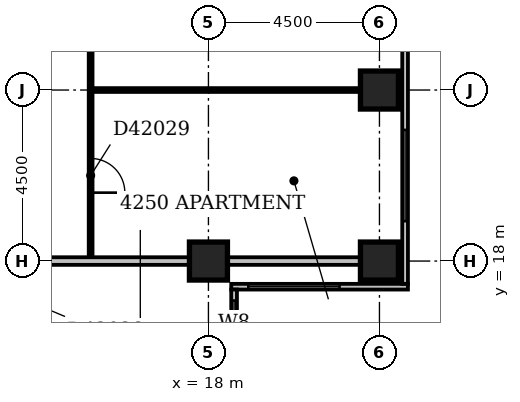
"""IFC4 building model, lengths in metres.
Left out: names, types, materials, properties, quantities, classifications, styles, units other than length and angle.
Written with IfcOpenShell. Run it as: python <this file> out.ifc"""

import sys

from ifc_helpers import new_model, si_unit, direction, frame, frame_2d, origin, origin_2d, place, context, subcontext, project, spatial, rectangle, extrude, element, fill, save


model = new_model("IFC4")
c1 = context("Model", 3, precision=1e-05, world=origin(), true_north=direction((0.0, 1.0)))
c2 = subcontext(c1, "Body", "Model", "MODEL_VIEW")
j1 = project(units=[si_unit("LENGTHUNIT", "METRE"), si_unit("PLANEANGLEUNIT", "RADIAN")], contexts=[c1])
p1 = place(None, origin())
s1 = spatial("IfcSite", under=j1, at=p1, CompositionType="ELEMENT")
p2 = place(p1, origin())
s2 = spatial("IfcBuilding", under=s1, at=p2, CompositionType="ELEMENT")
p3 = place(p2, frame((0.0, 0.0, 166.4)))
s3 = spatial("IfcBuildingStorey", under=s2, at=p3, CompositionType="ELEMENT", Elevation=166.4)
for number, where, z_axis, x_axis in (
    (1, (18.0, 18.0, -0.3), (0.0, 0.0, 1.0), (1.0, 0.0, 0.0)),
    (2, (22.5, 18.0, -0.3), (0.0, 0.0, 1.0), (1.0, 0.0, 0.0)),
    (3, (22.5, 22.5, -0.3), (0.0, 0.0, 1.0), (1.0, 0.0, 0.0)),
):
    element("IfcColumn", number, at=place(p3, frame(where, z_axis=z_axis, x_axis=x_axis)), inside=s3, PredefinedType="COLUMN", context=c2, shape_type="SweptSolid", body=[
        extrude(rectangle(XDim=1.0, YDim=1.0, at=origin_2d()), origin(), (0.0, 0.0, 1.0), 3.6),
    ])
p4 = place(p3, frame((18.675, 8.4, 0.0), z_axis=(0.0, 0.0, 1.0), x_axis=(0.0, 1.0, 0.0)))
e4 = element("IfcWall", 4, at=p4, inside=s3, PredefinedType="STANDARD", context=c2, shape_type="SweptSolid", body=[
    extrude(rectangle(XDim=8.85, YDim=0.15, at=frame_2d((4.425, 0.0))), origin(), (0.0, 0.0, 1.0), 2.7),
])
p5 = place(p4, frame((1.65, 0.0, 0.6)))
e5 = element("IfcOpeningElement", 5, at=p5, cuts=e4, PredefinedType="OPENING", context=c2, shape_type="SweptSolid", body=[
    extrude(rectangle(XDim=2.4, YDim=1.8, at=frame_2d((1.2, 0.9))), frame((0.0, 0.087, 0.0), z_axis=(0.0, -1.0, 0.0), x_axis=(1.0, 0.0, 0.0)), (0.0, 0.0, 1.0), 0.174),
])
p6 = place(p4, frame((7.36, 0.0, 0.6)))
e6 = element("IfcOpeningElement", 6, at=p6, cuts=e4, PredefinedType="OPENING", context=c2, shape_type="SweptSolid", body=[
    extrude(rectangle(XDim=1.2, YDim=1.8, at=frame_2d((0.6, 0.9))), frame((0.0, 0.087, 0.0), z_axis=(0.0, -1.0, 0.0), x_axis=(1.0, 0.0, 0.0)), (0.0, 0.0, 1.0), 0.174),
])
p7 = place(p3, frame((18.6, 17.325, 0.0), z_axis=(0.0, 0.0, 1.0), x_axis=(1.0, 0.0, 0.0)))
e7 = element("IfcWall", 7, at=p7, inside=s3, PredefinedType="STANDARD", context=c2, shape_type="SweptSolid", body=[
    extrude(rectangle(XDim=4.65, YDim=0.15, at=frame_2d((2.325, 0.0))), origin(), (0.0, 0.0, 1.0), 2.7),
])
p8 = place(p7, frame((0.45, 0.0, 0.6)))
e8 = element("IfcOpeningElement", 8, at=p8, cuts=e7, PredefinedType="OPENING", context=c2, shape_type="SweptSolid", body=[
    extrude(rectangle(XDim=2.4, YDim=1.8, at=frame_2d((1.2, 0.9))), frame((0.0, 0.087, 0.0), z_axis=(0.0, -1.0, 0.0), x_axis=(1.0, 0.0, 0.0)), (0.0, 0.0, 1.0), 0.174),
])
p9 = place(p3, frame((23.175, 17.4, 0.0), z_axis=(0.0, 0.0, 1.0), x_axis=(0.0, 1.0, 0.0)))
e9 = element("IfcWall", 9, at=p9, inside=s3, PredefinedType="STANDARD", context=c2, shape_type="SweptSolid", body=[
    extrude(rectangle(XDim=17.85, YDim=0.15, at=frame_2d((8.925, 0.0))), origin(), (0.0, 0.0, 1.0), 2.7),
])
p10 = place(p9, frame((1.65, 0.0, 0.6)))
e10 = element("IfcOpeningElement", 10, at=p10, cuts=e9, PredefinedType="OPENING", context=c2, shape_type="SweptSolid", body=[
    extrude(rectangle(XDim=2.4, YDim=1.8, at=frame_2d((1.2, 0.9))), frame((0.0, 0.087, 0.0), z_axis=(0.0, -1.0, 0.0), x_axis=(1.0, 0.0, 0.0)), (0.0, 0.0, 1.0), 0.174),
])
p11 = place(p9, frame((6.15, 0.0, 0.6)))
e11 = element("IfcOpeningElement", 11, at=p11, cuts=e9, PredefinedType="OPENING", context=c2, shape_type="SweptSolid", body=[
    extrude(rectangle(XDim=2.4, YDim=1.8, at=frame_2d((1.2, 0.9))), frame((0.0, 0.087, 0.0), z_axis=(0.0, -1.0, 0.0), x_axis=(1.0, 0.0, 0.0)), (0.0, 0.0, 1.0), 0.174),
])
p12 = place(p9, frame((10.38, 0.0, 0.6)))
e12 = element("IfcOpeningElement", 12, at=p12, cuts=e9, PredefinedType="OPENING", context=c2, shape_type="SweptSolid", body=[
    extrude(rectangle(XDim=2.1, YDim=1.8, at=frame_2d((1.05, 0.9))), frame((0.0, 0.087, 0.0), z_axis=(0.0, -1.0, 0.0), x_axis=(1.0, 0.0, 0.0)), (0.0, 0.0, 1.0), 0.174),
])
p13 = place(p9, frame((15.15, 0.0, 0.6)))
e13 = element("IfcOpeningElement", 13, at=p13, cuts=e9, PredefinedType="OPENING", context=c2, shape_type="SweptSolid", body=[
    extrude(rectangle(XDim=2.4, YDim=1.8, at=frame_2d((1.2, 0.9))), frame((0.0, 0.087, 0.0), z_axis=(0.0, -1.0, 0.0), x_axis=(1.0, 0.0, 0.0)), (0.0, 0.0, 1.0), 0.174),
])
p14 = place(p3, frame((9.1, 18.0, 0.0), z_axis=(0.0, 0.0, 1.0), x_axis=(1.0, 0.0, 0.0)))
e14 = element("IfcWall", 14, at=p14, inside=s3, PredefinedType="PARTITIONING", context=c2, shape_type="SweptSolid", body=[
    extrude(rectangle(XDim=8.4, YDim=0.2, at=frame_2d((4.2, 0.0))), origin(), (0.0, 0.0, 1.0), 2.6),
])
p15 = place(p3, frame((18.5, 18.0, 0.0), z_axis=(0.0, 0.0, 1.0), x_axis=(1.0, 0.0, 0.0)))
e15 = element("IfcWall", 15, at=p15, inside=s3, PredefinedType="PARTITIONING", context=c2, shape_type="SweptSolid", body=[
    extrude(rectangle(XDim=3.5, YDim=0.2, at=frame_2d((1.75, 0.0))), origin(), (0.0, 0.0, 1.0), 2.7),
])
p16 = place(p3, frame((14.9, 18.1, 0.0), z_axis=(0.0, 0.0, 1.0), x_axis=(0.0, 1.0, 0.0)))
e16 = element("IfcWall", 16, at=p16, inside=s3, PredefinedType="PARTITIONING", context=c2, shape_type="SweptSolid", body=[
    extrude(rectangle(XDim=13.3, YDim=0.1, at=frame_2d((6.65, 0.0))), origin(), (0.0, 0.0, 1.0), 3.3),
])
p17 = place(p16, frame((1.7, 0.0, 0.0)))
e17 = element("IfcOpeningElement", 17, at=p17, cuts=e16, PredefinedType="OPENING", context=c2, shape_type="SweptSolid", body=[
    extrude(rectangle(XDim=0.9, YDim=2.1, at=frame_2d((0.45, 1.05))), frame((0.0, 0.062, 0.0), z_axis=(0.0, -1.0, 0.0), x_axis=(1.0, 0.0, 0.0)), (0.0, 0.0, 1.0), 0.124),
])
p18 = place(p16, frame((6.2, 0.0, 0.0)))
e18 = element("IfcOpeningElement", 18, at=p18, cuts=e16, PredefinedType="OPENING", context=c2, shape_type="SweptSolid", body=[
    extrude(rectangle(XDim=0.9, YDim=2.1, at=frame_2d((0.45, 1.05))), frame((0.0, 0.062, 0.0), z_axis=(0.0, -1.0, 0.0), x_axis=(1.0, 0.0, 0.0)), (0.0, 0.0, 1.0), 0.124),
])
p19 = place(p16, frame((10.7, 0.0, 0.0)))
e19 = element("IfcOpeningElement", 19, at=p19, cuts=e16, PredefinedType="OPENING", context=c2, shape_type="SweptSolid", body=[
    extrude(rectangle(XDim=0.9, YDim=2.1, at=frame_2d((0.45, 1.05))), frame((0.0, 0.062, 0.0), z_axis=(0.0, -1.0, 0.0), x_axis=(1.0, 0.0, 0.0)), (0.0, 0.0, 1.0), 0.124),
])
p20 = place(p3, frame((14.95, 22.5, 0.0), z_axis=(0.0, 0.0, 1.0), x_axis=(1.0, 0.0, 0.0)))
e20 = element("IfcWall", 20, at=p20, inside=s3, PredefinedType="PARTITIONING", context=c2, shape_type="SweptSolid", body=[
    extrude(rectangle(XDim=7.05, YDim=0.1, at=frame_2d((3.525, 0.0))), origin(), (0.0, 0.0, 1.0), 3.3),
])
p21 = place(p6, origin())
e21 = element("IfcWindow", 21, at=p21, inside=s3, PartitioningType="SINGLE_PANEL", PredefinedType="WINDOW", context=c2, shape_type="SweptSolid", body=[
    extrude(rectangle(XDim=1.2, YDim=1.8, at=frame_2d((0.6, 0.9))), frame((0.0, 0.03, 0.0), z_axis=(0.0, -1.0, 0.0), x_axis=(1.0, 0.0, 0.0)), (0.0, 0.0, 1.0), 0.06),
])
fill(e6, e21)
p22 = place(p8, origin())
e22 = element("IfcWindow", 22, at=p22, inside=s3, PartitioningType="SINGLE_PANEL", PredefinedType="WINDOW", context=c2, shape_type="SweptSolid", body=[
    extrude(rectangle(XDim=2.4, YDim=1.8, at=frame_2d((1.2, 0.9))), frame((0.0, 0.03, 0.0), z_axis=(0.0, -1.0, 0.0), x_axis=(1.0, 0.0, 0.0)), (0.0, 0.0, 1.0), 0.06),
])
fill(e8, e22)
p23 = place(p10, origin())
e23 = element("IfcWindow", 23, at=p23, inside=s3, PartitioningType="SINGLE_PANEL", PredefinedType="WINDOW", context=c2, shape_type="SweptSolid", body=[
    extrude(rectangle(XDim=2.4, YDim=1.8, at=frame_2d((1.2, 0.9))), frame((0.0, 0.03, 0.0), z_axis=(0.0, -1.0, 0.0), x_axis=(1.0, 0.0, 0.0)), (0.0, 0.0, 1.0), 0.06),
])
fill(e10, e23)
p24 = place(p17, frame((0.9, 0.0, 0.0), z_axis=(0.0, 0.0, 1.0), x_axis=(-1.0, 0.0, 0.0)))
e24 = element("IfcDoor", 24, at=p24, inside=s3, OperationType="SINGLE_SWING_RIGHT", PredefinedType="DOOR", context=c2, shape_type="SweptSolid", body=[
    extrude(rectangle(XDim=0.9, YDim=2.1, at=frame_2d((0.45, 1.05))), frame((0.0, 0.025, 0.0), z_axis=(0.0, -1.0, 0.0), x_axis=(1.0, 0.0, 0.0)), (0.0, 0.0, 1.0), 0.05),
])
fill(e17, e24)
save(model, sys.argv[1])
